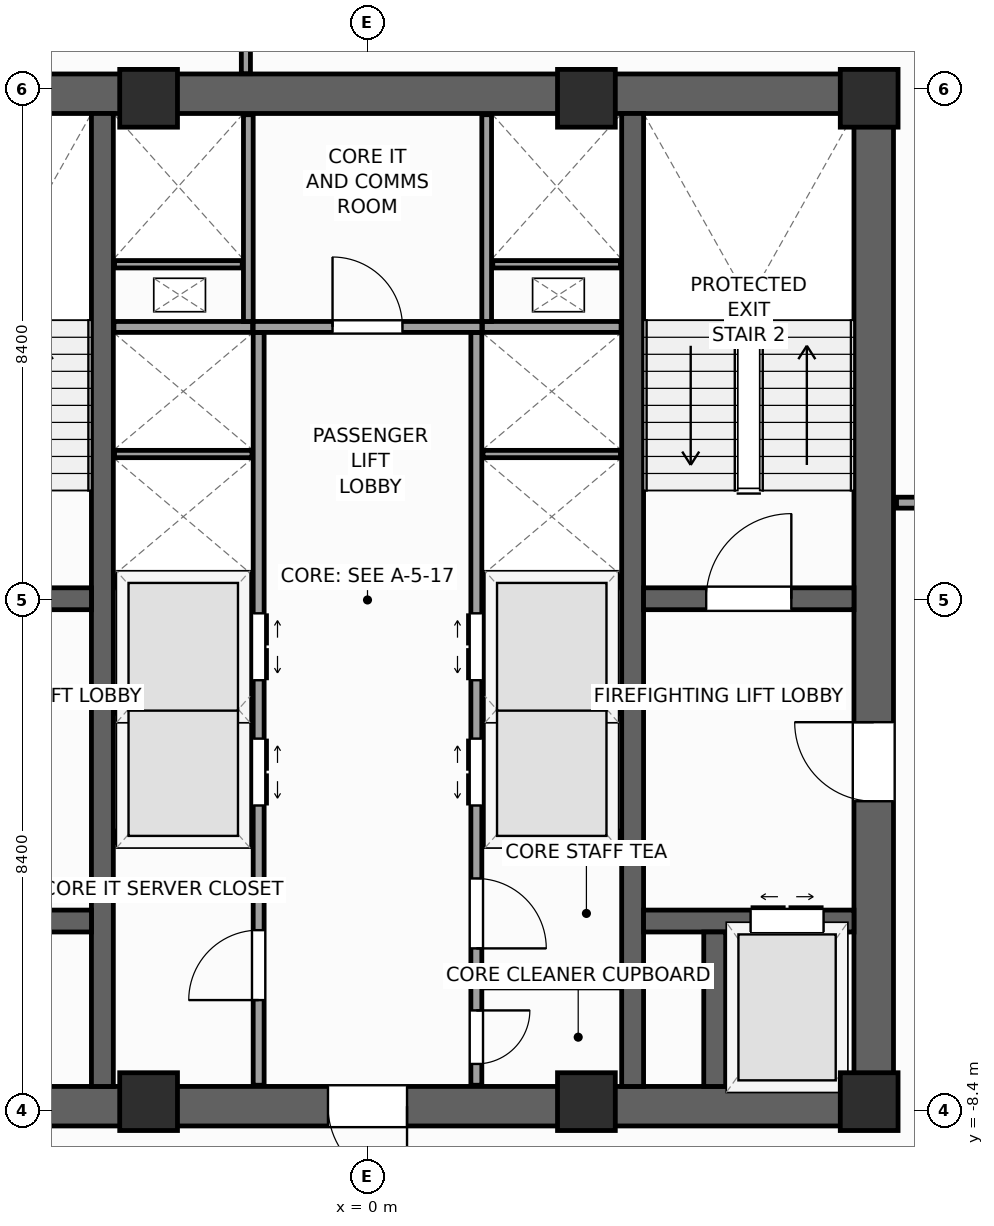
"""IFC4 building model, lengths in metres.
Left out: names, types, materials, properties, quantities, classifications, styles, units other than length and angle.
Written with IfcOpenShell. Run it as: python <this file> out.ifc"""

import sys

from ifc_helpers import new_model, si_unit, direction, frame, frame_2d, origin, origin_2d, place, context, subcontext, project, spatial, rectangle, extrude, source, transform, mapped, element, fill, save


model = new_model("IFC4")
c1 = context("Model", 3, precision=1e-05, world=origin(), true_north=direction((0.0, 1.0)))
c2 = subcontext(c1, "Body", "Model", "MODEL_VIEW")
j1 = project(units=[si_unit("LENGTHUNIT", "METRE"), si_unit("PLANEANGLEUNIT", "RADIAN")], contexts=[c1])
p1 = place(None, origin())
s1 = spatial("IfcSite", under=j1, at=p1, CompositionType="ELEMENT")
p2 = place(p1, origin())
s2 = spatial("IfcBuilding", under=s1, at=p2, CompositionType="ELEMENT")
p3 = place(p2, frame((0.0, 0.0, 188.4)))
s3 = spatial("IfcBuildingStorey", under=s2, at=p3, CompositionType="ELEMENT", Elevation=188.4)
p4 = place(p3, frame((-8.65, -8.325, 0.0), z_axis=(0.0, 0.0, 1.0), x_axis=(1.0, 0.0, 0.0)))
e1 = element("IfcWall", 1, at=p4, inside=s3, PredefinedType="SHEAR", context=c2, shape_type="SweptSolid", body=[
    extrude(rectangle(XDim=17.3, YDim=0.65, at=frame_2d((8.65, 0.0))), origin(), (0.0, 0.0, 1.0), 4.0),
])
p5 = place(p4, frame((8.0, 0.0, 0.0)))
e2 = element("IfcOpeningElement", 2, at=p5, cuts=e1, PredefinedType="OPENING", context=c2, shape_type="SweptSolid", body=[
    extrude(rectangle(XDim=1.3, YDim=2.2, at=frame_2d((0.65, 1.1))), frame((0.0, 0.335, 0.0), z_axis=(0.0, -1.0, 0.0), x_axis=(1.0, 0.0, 0.0)), (0.0, 0.0, 1.0), 0.67),
])
p6 = place(p3, frame((-8.65, 8.325, 0.0), z_axis=(0.0, 0.0, 1.0), x_axis=(1.0, 0.0, 0.0)))
e3 = element("IfcWall", 3, at=p6, inside=s3, PredefinedType="SHEAR", context=c2, shape_type="SweptSolid", body=[
    extrude(rectangle(XDim=17.3, YDim=0.65, at=frame_2d((8.65, 0.0))), origin(), (0.0, 0.0, 1.0), 4.0),
])
p7 = place(p3, frame((8.325, -8.0, 0.0), z_axis=(0.0, 0.0, 1.0), x_axis=(0.0, 1.0, 0.0)))
e4 = element("IfcWall", 4, at=p7, inside=s3, PredefinedType="SHEAR", context=c2, shape_type="SweptSolid", body=[
    extrude(rectangle(XDim=16.0, YDim=0.65, at=frame_2d((8.0, 0.0))), origin(), (0.0, 0.0, 1.0), 4.0),
])
p8 = place(p7, frame((4.69, 0.0, 0.0)))
e5 = element("IfcOpeningElement", 5, at=p8, cuts=e4, PredefinedType="OPENING", context=c2, shape_type="SweptSolid", body=[
    extrude(rectangle(XDim=1.3, YDim=2.2, at=frame_2d((0.65, 1.1))), frame((0.0, 0.335, 0.0), z_axis=(0.0, -1.0, 0.0), x_axis=(1.0, 0.0, 0.0)), (0.0, 0.0, 1.0), 0.67),
])
for number, where, z_axis, x_axis in (
    (6, (-4.36, -8.0, 0.0), (0.0, 0.0, 1.0), (0.0, 1.0, 0.0)),
    (7, (4.36, -8.0, 0.0), (0.0, 0.0, 1.0), (0.0, 1.0, 0.0)),
):
    element("IfcWall", number, at=place(p3, frame(where, z_axis=z_axis, x_axis=x_axis)), inside=s3, PredefinedType="SHEAR", context=c2, shape_type="SweptSolid", body=[
        extrude(rectangle(XDim=16.0, YDim=0.36, at=frame_2d((8.0, 0.0))), origin(), (0.0, 0.0, 1.0), 4.0),
    ])
p9 = place(p3, frame((-8.0, 0.02, 0.0), z_axis=(0.0, 0.0, 1.0), x_axis=(1.0, 0.0, 0.0)))
e8 = element("IfcWall", 8, at=p9, inside=s3, PredefinedType="SHEAR", context=c2, shape_type="SweptSolid", body=[
    extrude(rectangle(XDim=3.46, YDim=0.36, at=frame_2d((1.73, 0.0))), origin(), (0.0, 0.0, 1.0), 4.0),
])
p10 = place(p9, frame((1.03, 0.0, 0.0)))
e9 = element("IfcOpeningElement", 9, at=p10, cuts=e8, PredefinedType="OPENING", context=c2, shape_type="SweptSolid", body=[
    extrude(rectangle(XDim=1.4, YDim=2.2, at=frame_2d((0.7, 1.1))), frame((0.0, 0.19, 0.0), z_axis=(0.0, -1.0, 0.0), x_axis=(1.0, 0.0, 0.0)), (0.0, 0.0, 1.0), 0.38),
])
p11 = place(p3, frame((4.54, 0.02, 0.0), z_axis=(0.0, 0.0, 1.0), x_axis=(1.0, 0.0, 0.0)))
e10 = element("IfcWall", 10, at=p11, inside=s3, PredefinedType="SHEAR", context=c2, shape_type="SweptSolid", body=[
    extrude(rectangle(XDim=3.46, YDim=0.36, at=frame_2d((1.73, 0.0))), origin(), (0.0, 0.0, 1.0), 4.0),
])
p12 = place(p11, frame((1.03, 0.0, 0.0)))
e11 = element("IfcOpeningElement", 11, at=p12, cuts=e10, PredefinedType="OPENING", context=c2, shape_type="SweptSolid", body=[
    extrude(rectangle(XDim=1.4, YDim=2.2, at=frame_2d((0.7, 1.1))), frame((0.0, 0.19, 0.0), z_axis=(0.0, -1.0, 0.0), x_axis=(1.0, 0.0, 0.0)), (0.0, 0.0, 1.0), 0.38),
])
p13 = place(p3, frame((-8.0, -5.28, 0.0), z_axis=(0.0, 0.0, 1.0), x_axis=(1.0, 0.0, 0.0)))
e12 = element("IfcWall", 12, at=p13, inside=s3, PredefinedType="SHEAR", context=c2, shape_type="SweptSolid", body=[
    extrude(rectangle(XDim=3.46, YDim=0.36, at=frame_2d((1.73, 0.0))), origin(), (0.0, 0.0, 1.0), 4.0),
])
p14 = place(p13, frame((0.5, 0.0, 0.0)))
e13 = element("IfcOpeningElement", 13, at=p14, cuts=e12, PredefinedType="OPENING", context=c2, shape_type="SweptSolid", body=[
    extrude(rectangle(XDim=1.2, YDim=2.25, at=frame_2d((0.6, 1.125))), frame((0.0, 0.19, 0.0), z_axis=(0.0, -1.0, 0.0), x_axis=(1.0, 0.0, 0.0)), (0.0, 0.0, 1.0), 0.38),
])
p15 = place(p3, frame((4.54, -5.28, 0.0), z_axis=(0.0, 0.0, 1.0), x_axis=(1.0, 0.0, 0.0)))
e14 = element("IfcWall", 14, at=p15, inside=s3, PredefinedType="SHEAR", context=c2, shape_type="SweptSolid", body=[
    extrude(rectangle(XDim=3.46, YDim=0.36, at=frame_2d((1.73, 0.0))), origin(), (0.0, 0.0, 1.0), 4.0),
])
p16 = place(p15, frame((1.76, 0.0, 0.0)))
e15 = element("IfcOpeningElement", 15, at=p16, cuts=e14, PredefinedType="OPENING", context=c2, shape_type="SweptSolid", body=[
    extrude(rectangle(XDim=1.2, YDim=2.25, at=frame_2d((0.6, 1.125))), frame((0.0, 0.19, 0.0), z_axis=(0.0, -1.0, 0.0), x_axis=(1.0, 0.0, 0.0)), (0.0, 0.0, 1.0), 0.38),
])
p17 = place(p3, frame((5.71, -8.0, 0.0), z_axis=(0.0, 0.0, 1.0), x_axis=(0.0, 1.0, 0.0)))
e16 = element("IfcWall", 16, at=p17, inside=s3, PredefinedType="SHEAR", context=c2, shape_type="SweptSolid", body=[
    extrude(rectangle(XDim=2.54, YDim=0.36, at=frame_2d((1.27, 0.0))), origin(), (0.0, 0.0, 1.0), 4.0),
])
m1 = source(origin(), c2, "Body", "SweptSolid", [
    extrude(rectangle(XDim=0.95, YDim=0.95, at=origin_2d()), origin(), (0.0, 0.0, 1.0), 4.0),
])
for number, where, z_axis, x_axis in (
    (17, (8.25, -8.25, 0.0), (0.0, 0.0, 1.0), (1.0, 0.0, 0.0)),
    (18, (8.25, 8.25, 0.0), (0.0, 0.0, 1.0), (1.0, 0.0, 0.0)),
    (19, (-3.6, -8.25, 0.0), (0.0, 0.0, 1.0), (1.0, 0.0, 0.0)),
    (20, (3.6, -8.25, 0.0), (0.0, 0.0, 1.0), (1.0, 0.0, 0.0)),
    (21, (-3.6, 8.25, 0.0), (0.0, 0.0, 1.0), (1.0, 0.0, 0.0)),
    (22, (3.6, 8.25, 0.0), (0.0, 0.0, 1.0), (1.0, 0.0, 0.0)),
):
    element("IfcColumn", number, at=place(p3, frame(where, z_axis=z_axis, x_axis=x_axis)), inside=s3, PredefinedType="PILASTER", context=c2, shape_type="MappedRepresentation", body=[
        mapped(m1, transform((0.0, 0.0, 0.0), scale=1.0)),
    ])
p18 = place(p3, frame((-1.79, -7.98, 0.0), z_axis=(0.0, 0.0, 1.0), x_axis=(0.0, 1.0, 0.0)))
e23 = element("IfcWall", 23, at=p18, inside=s3, PredefinedType="PARTITIONING", context=c2, shape_type="SweptSolid", body=[
    extrude(rectangle(XDim=12.38, YDim=0.18, at=frame_2d((6.19, 0.0))), origin(), (0.0, 0.0, 1.0), 3.74),
])
p19 = place(p18, frame((4.6, 0.0, 0.0)))
e24 = element("IfcOpeningElement", 24, at=p19, cuts=e23, PredefinedType="OPENING", context=c2, shape_type="SweptSolid", body=[
    extrude(rectangle(XDim=1.1, YDim=2.2, at=frame_2d((0.55, 1.1))), frame((0.0, 0.1, 0.0), z_axis=(0.0, -1.0, 0.0), x_axis=(1.0, 0.0, 0.0)), (0.0, 0.0, 1.0), 0.2),
])
p20 = place(p18, frame((6.66, 0.0, 0.0)))
e25 = element("IfcOpeningElement", 25, at=p20, cuts=e23, PredefinedType="OPENING", context=c2, shape_type="SweptSolid", body=[
    extrude(rectangle(XDim=1.1, YDim=2.2, at=frame_2d((0.55, 1.1))), frame((0.0, 0.1, 0.0), z_axis=(0.0, -1.0, 0.0), x_axis=(1.0, 0.0, 0.0)), (0.0, 0.0, 1.0), 0.2),
])
p21 = place(p18, frame((1.4, 0.0, 0.0)))
e26 = element("IfcOpeningElement", 26, at=p21, cuts=e23, PredefinedType="OPENING", context=c2, shape_type="SweptSolid", body=[
    extrude(rectangle(XDim=1.15, YDim=2.25, at=frame_2d((0.575, 1.125))), frame((0.0, 0.1, 0.0), z_axis=(0.0, -1.0, 0.0), x_axis=(1.0, 0.0, 0.0)), (0.0, 0.0, 1.0), 0.2),
])
p22 = place(p3, frame((1.79, -7.98, 0.0), z_axis=(0.0, 0.0, 1.0), x_axis=(0.0, 1.0, 0.0)))
e27 = element("IfcWall", 27, at=p22, inside=s3, PredefinedType="PARTITIONING", context=c2, shape_type="SweptSolid", body=[
    extrude(rectangle(XDim=12.38, YDim=0.18, at=frame_2d((6.19, 0.0))), origin(), (0.0, 0.0, 1.0), 3.74),
])
p23 = place(p22, frame((4.6, 0.0, 0.0)))
e28 = element("IfcOpeningElement", 28, at=p23, cuts=e27, PredefinedType="OPENING", context=c2, shape_type="SweptSolid", body=[
    extrude(rectangle(XDim=1.1, YDim=2.2, at=frame_2d((0.55, 1.1))), frame((0.0, 0.1, 0.0), z_axis=(0.0, -1.0, 0.0), x_axis=(1.0, 0.0, 0.0)), (0.0, 0.0, 1.0), 0.2),
])
p24 = place(p22, frame((6.66, 0.0, 0.0)))
e29 = element("IfcOpeningElement", 29, at=p24, cuts=e27, PredefinedType="OPENING", context=c2, shape_type="SweptSolid", body=[
    extrude(rectangle(XDim=1.1, YDim=2.2, at=frame_2d((0.55, 1.1))), frame((0.0, 0.1, 0.0), z_axis=(0.0, -1.0, 0.0), x_axis=(1.0, 0.0, 0.0)), (0.0, 0.0, 1.0), 0.2),
])
p25 = place(p22, frame((0.35, 0.0, 0.0)))
e30 = element("IfcOpeningElement", 30, at=p25, cuts=e27, PredefinedType="OPENING", context=c2, shape_type="SweptSolid", body=[
    extrude(rectangle(XDim=0.88, YDim=2.1, at=frame_2d((0.44, 1.05))), frame((0.0, 0.1, 0.0), z_axis=(0.0, -1.0, 0.0), x_axis=(1.0, 0.0, 0.0)), (0.0, 0.0, 1.0), 0.2),
])
p26 = place(p22, frame((2.25, 0.0, 0.0)))
e31 = element("IfcOpeningElement", 31, at=p26, cuts=e27, PredefinedType="OPENING", context=c2, shape_type="SweptSolid", body=[
    extrude(rectangle(XDim=1.15, YDim=2.25, at=frame_2d((0.575, 1.125))), frame((0.0, 0.1, 0.0), z_axis=(0.0, -1.0, 0.0), x_axis=(1.0, 0.0, 0.0)), (0.0, 0.0, 1.0), 0.2),
])
p27 = place(p3, frame((-1.88, 4.49, 0.0), z_axis=(0.0, 0.0, 1.0), x_axis=(1.0, 0.0, 0.0)))
e32 = element("IfcWall", 32, at=p27, inside=s3, PredefinedType="PARTITIONING", context=c2, shape_type="SweptSolid", body=[
    extrude(rectangle(XDim=3.76, YDim=0.18, at=frame_2d((1.88, 0.0))), origin(), (0.0, 0.0, 1.0), 3.74),
])
p28 = place(p27, frame((1.305, 0.0, 0.0)))
e33 = element("IfcOpeningElement", 33, at=p28, cuts=e32, PredefinedType="OPENING", context=c2, shape_type="SweptSolid", body=[
    extrude(rectangle(XDim=1.15, YDim=2.25, at=frame_2d((0.575, 1.125))), frame((0.0, 0.1, 0.0), z_axis=(0.0, -1.0, 0.0), x_axis=(1.0, 0.0, 0.0)), (0.0, 0.0, 1.0), 0.2),
])
for number, where, z_axis, x_axis in (
    (34, (-4.17, -3.9, 0.0), (0.0, 0.0, 1.0), (1.0, 0.0, 0.0)),
    (35, (1.89, -3.9, 0.0), (0.0, 0.0, 1.0), (1.0, 0.0, 0.0)),
    (36, (-4.17, 0.3, 0.0), (0.0, 0.0, 1.0), (1.0, 0.0, 0.0)),
    (37, (1.89, 0.3, 0.0), (0.0, 0.0, 1.0), (1.0, 0.0, 0.0)),
    (38, (-4.17, 4.49, 0.0), (0.0, 0.0, 1.0), (1.0, 0.0, 0.0)),
    (39, (1.89, 4.49, 0.0), (0.0, 0.0, 1.0), (1.0, 0.0, 0.0)),
):
    element("IfcWall", number, at=place(p3, frame(where, z_axis=z_axis, x_axis=x_axis)), inside=s3, PredefinedType="PARTITIONING", context=c2, shape_type="SweptSolid", body=[
        extrude(rectangle(XDim=2.28, YDim=0.18, at=frame_2d((1.14, 0.0))), origin(), (0.0, 0.0, 1.0), 3.74),
    ])
for number, where, z_axis, x_axis in (
    (40, (-4.16, -1.8, 0.0), (0.0, 0.0, 1.0), (1.0, 0.0, 0.0)),
    (41, (1.9, -1.8, 0.0), (0.0, 0.0, 1.0), (1.0, 0.0, 0.0)),
    (42, (-4.16, 2.4, 0.0), (0.0, 0.0, 1.0), (1.0, 0.0, 0.0)),
    (43, (1.9, 2.4, 0.0), (0.0, 0.0, 1.0), (1.0, 0.0, 0.0)),
):
    element("IfcWall", number, at=place(p3, frame(where, z_axis=z_axis, x_axis=x_axis)), inside=s3, PredefinedType="PARTITIONING", context=c2, shape_type="SweptSolid", body=[
        extrude(rectangle(XDim=2.26, YDim=0.12, at=frame_2d((1.13, 0.0))), origin(), (0.0, 0.0, 1.0), 3.74),
    ])
p29 = place(p3, frame((1.89, -6.3, 0.0), z_axis=(0.0, 0.0, 1.0), x_axis=(1.0, 0.0, 0.0)))
e44 = element("IfcWall", 44, at=p29, inside=s3, PredefinedType="PARTITIONING", context=c2, shape_type="SweptSolid", body=[
    extrude(rectangle(XDim=2.28, YDim=0.16, at=frame_2d((1.14, 0.0))), origin(), (0.0, 0.0, 1.0), 3.74),
])
for number, where, z_axis, x_axis in (
    (45, (-1.96, 4.58, 0.0), (0.0, 0.0, 1.0), (0.0, 1.0, 0.0)),
    (46, (1.96, 4.58, 0.0), (0.0, 0.0, 1.0), (0.0, 1.0, 0.0)),
):
    element("IfcWall", number, at=place(p3, frame(where, z_axis=z_axis, x_axis=x_axis)), inside=s3, PredefinedType="PARTITIONING", context=c2, shape_type="SweptSolid", body=[
        extrude(rectangle(XDim=3.4, YDim=0.16, at=frame_2d((1.7, 0.0))), origin(), (0.0, 0.0, 1.0), 3.74),
    ])
for number, where, z_axis, x_axis in (
    (47, (-4.16, 5.52, 0.0), (0.0, 0.0, 1.0), (1.0, 0.0, 0.0)),
    (48, (2.06, 5.52, 0.0), (0.0, 0.0, 1.0), (1.0, 0.0, 0.0)),
):
    element("IfcWall", number, at=place(p3, frame(where, z_axis=z_axis, x_axis=x_axis)), inside=s3, PredefinedType="PARTITIONING", context=c2, shape_type="SweptSolid", body=[
        extrude(rectangle(XDim=2.1, YDim=0.12, at=frame_2d((1.05, 0.0))), origin(), (0.0, 0.0, 1.0), 3.74),
    ])
p30 = place(p3, frame((8.7, 1.6, 0.0), z_axis=(0.0, 0.0, 1.0), x_axis=(1.0, 0.0, 0.0)))
e49 = element("IfcWall", 49, at=p30, inside=s3, PredefinedType="PARTITIONING", context=c2, shape_type="SweptSolid", body=[
    extrude(rectangle(XDim=2.85, YDim=0.18, at=frame_2d((1.425, 0.0))), origin(), (0.0, 0.0, 1.0), 3.74),
])
p31 = place(p30, frame((0.875, 0.0, 0.0)))
e50 = element("IfcOpeningElement", 50, at=p31, cuts=e49, PredefinedType="OPENING", context=c2, shape_type="SweptSolid", body=[
    extrude(rectangle(XDim=1.1, YDim=2.2, at=frame_2d((0.55, 1.1))), frame((0.0, 0.1, 0.0), z_axis=(0.0, -1.0, 0.0), x_axis=(1.0, 0.0, 0.0)), (0.0, 0.0, 1.0), 0.2),
])
p32 = place(p3, frame((-2.0, 8.655, 0.0), z_axis=(0.0, 0.0, 1.0), x_axis=(0.0, 1.0, 0.0)))
e51 = element("IfcWall", 51, at=p32, inside=s3, PredefinedType="PARTITIONING", context=c2, shape_type="SweptSolid", body=[
    extrude(rectangle(XDim=20.423, YDim=0.15, at=frame_2d((10.211, 0.0))), origin(), (0.0, 0.0, 1.0), 3.74),
])
m2 = source(origin(), c2, "Body", "SweptSolid", [
    extrude(rectangle(XDim=1.4, YDim=2.2, at=frame_2d((0.7, 1.1))), frame((0.0, 0.025, 0.0), z_axis=(0.0, -1.0, 0.0), x_axis=(1.0, 0.0, 0.0)), (0.0, 0.0, 1.0), 0.05),
])
p33 = place(p12, origin())
e52 = element("IfcDoor", 52, at=p33, inside=s3, OperationType="SINGLE_SWING_RIGHT", PredefinedType="DOOR", context=c2, shape_type="MappedRepresentation", body=[
    mapped(m2, transform((0.0, 0.0, 0.0), scale=1.0)),
])
fill(e11, e52)
m3 = source(origin(), c2, "Body", "SweptSolid", [
    extrude(rectangle(XDim=1.3, YDim=2.2, at=frame_2d((0.65, 1.1))), frame((0.0, 0.025, 0.0), z_axis=(0.0, -1.0, 0.0), x_axis=(1.0, 0.0, 0.0)), (0.0, 0.0, 1.0), 0.05),
])
p34 = place(p8, origin())
e53 = element("IfcDoor", 53, at=p34, inside=s3, OperationType="SINGLE_SWING_RIGHT", PredefinedType="DOOR", context=c2, shape_type="MappedRepresentation", body=[
    mapped(m3, transform((0.0, 0.0, 0.0), scale=1.0)),
])
fill(e5, e53)
p35 = place(p5, frame((1.3, 0.0, 0.0), z_axis=(0.0, 0.0, 1.0), x_axis=(-1.0, 0.0, 0.0)))
e54 = element("IfcDoor", 54, at=p35, inside=s3, OperationType="SINGLE_SWING_RIGHT", PredefinedType="DOOR", context=c2, shape_type="MappedRepresentation", body=[
    mapped(m3, transform((0.0, 0.0, 0.0), scale=1.0)),
])
fill(e2, e54)
m4 = source(origin(), c2, "Body", "SweptSolid", [
    extrude(rectangle(XDim=1.2, YDim=2.25, at=frame_2d((0.6, 1.125))), frame((0.0, 0.025, 0.0), z_axis=(0.0, -1.0, 0.0), x_axis=(1.0, 0.0, 0.0)), (0.0, 0.0, 1.0), 0.05),
])
p36 = place(p16, origin())
e55 = element("IfcDoor", 55, at=p36, inside=s3, OperationType="DOUBLE_DOOR_SLIDING", PredefinedType="DOOR", context=c2, shape_type="MappedRepresentation", body=[
    mapped(m4, transform((0.0, 0.0, 0.0), scale=1.0)),
])
fill(e15, e55)
m5 = source(origin(), c2, "Body", "SweptSolid", [
    extrude(rectangle(XDim=1.1, YDim=2.2, at=frame_2d((0.55, 1.1))), frame((0.0, 0.025, 0.0), z_axis=(0.0, -1.0, 0.0), x_axis=(1.0, 0.0, 0.0)), (0.0, 0.0, 1.0), 0.05),
])
p37 = place(p19, frame((1.1, 0.0, 0.0), z_axis=(0.0, 0.0, 1.0), x_axis=(-1.0, 0.0, 0.0)))
e56 = element("IfcDoor", 56, at=p37, inside=s3, OperationType="DOUBLE_DOOR_SLIDING", PredefinedType="DOOR", context=c2, shape_type="MappedRepresentation", body=[
    mapped(m5, transform((0.0, 0.0, 0.0), scale=1.0)),
])
fill(e24, e56)
p38 = place(p20, frame((1.1, 0.0, 0.0), z_axis=(0.0, 0.0, 1.0), x_axis=(-1.0, 0.0, 0.0)))
e57 = element("IfcDoor", 57, at=p38, inside=s3, OperationType="DOUBLE_DOOR_SLIDING", PredefinedType="DOOR", context=c2, shape_type="MappedRepresentation", body=[
    mapped(m5, transform((0.0, 0.0, 0.0), scale=1.0)),
])
fill(e25, e57)
p39 = place(p23, origin())
e58 = element("IfcDoor", 58, at=p39, inside=s3, OperationType="DOUBLE_DOOR_SLIDING", PredefinedType="DOOR", context=c2, shape_type="MappedRepresentation", body=[
    mapped(m5, transform((0.0, 0.0, 0.0), scale=1.0)),
])
fill(e28, e58)
p40 = place(p24, origin())
e59 = element("IfcDoor", 59, at=p40, inside=s3, OperationType="DOUBLE_DOOR_SLIDING", PredefinedType="DOOR", context=c2, shape_type="MappedRepresentation", body=[
    mapped(m5, transform((0.0, 0.0, 0.0), scale=1.0)),
])
fill(e29, e59)
m6 = source(origin(), c2, "Body", "SweptSolid", [
    extrude(rectangle(XDim=1.15, YDim=2.25, at=frame_2d((0.575, 1.125))), frame((0.0, 0.025, 0.0), z_axis=(0.0, -1.0, 0.0), x_axis=(1.0, 0.0, 0.0)), (0.0, 0.0, 1.0), 0.05),
])
p41 = place(p21, origin())
e60 = element("IfcDoor", 60, at=p41, inside=s3, OperationType="SINGLE_SWING_LEFT", PredefinedType="DOOR", context=c2, shape_type="MappedRepresentation", body=[
    mapped(m6, transform((0.0, 0.0, 0.0), scale=1.0)),
])
fill(e26, e60)
m7 = source(origin(), c2, "Body", "SweptSolid", [
    extrude(rectangle(XDim=0.88, YDim=2.1, at=frame_2d((0.44, 1.05))), frame((0.0, 0.025, 0.0), z_axis=(0.0, -1.0, 0.0), x_axis=(1.0, 0.0, 0.0)), (0.0, 0.0, 1.0), 0.05),
])
p42 = place(p25, frame((0.88, 0.0, 0.0), z_axis=(0.0, 0.0, 1.0), x_axis=(-1.0, 0.0, 0.0)))
e61 = element("IfcDoor", 61, at=p42, inside=s3, OperationType="SINGLE_SWING_RIGHT", PredefinedType="DOOR", context=c2, shape_type="MappedRepresentation", body=[
    mapped(m7, transform((0.0, 0.0, 0.0), scale=1.0)),
])
fill(e30, e61)
p43 = place(p26, frame((1.15, 0.0, 0.0), z_axis=(0.0, 0.0, 1.0), x_axis=(-1.0, 0.0, 0.0)))
e62 = element("IfcDoor", 62, at=p43, inside=s3, OperationType="SINGLE_SWING_LEFT", PredefinedType="DOOR", context=c2, shape_type="MappedRepresentation", body=[
    mapped(m6, transform((0.0, 0.0, 0.0), scale=1.0)),
])
fill(e31, e62)
p44 = place(p28, origin())
e63 = element("IfcDoor", 63, at=p44, inside=s3, OperationType="SINGLE_SWING_LEFT", PredefinedType="DOOR", context=c2, shape_type="MappedRepresentation", body=[
    mapped(m6, transform((0.0, 0.0, 0.0), scale=1.0)),
])
fill(e33, e63)
save(model, sys.argv[1])
